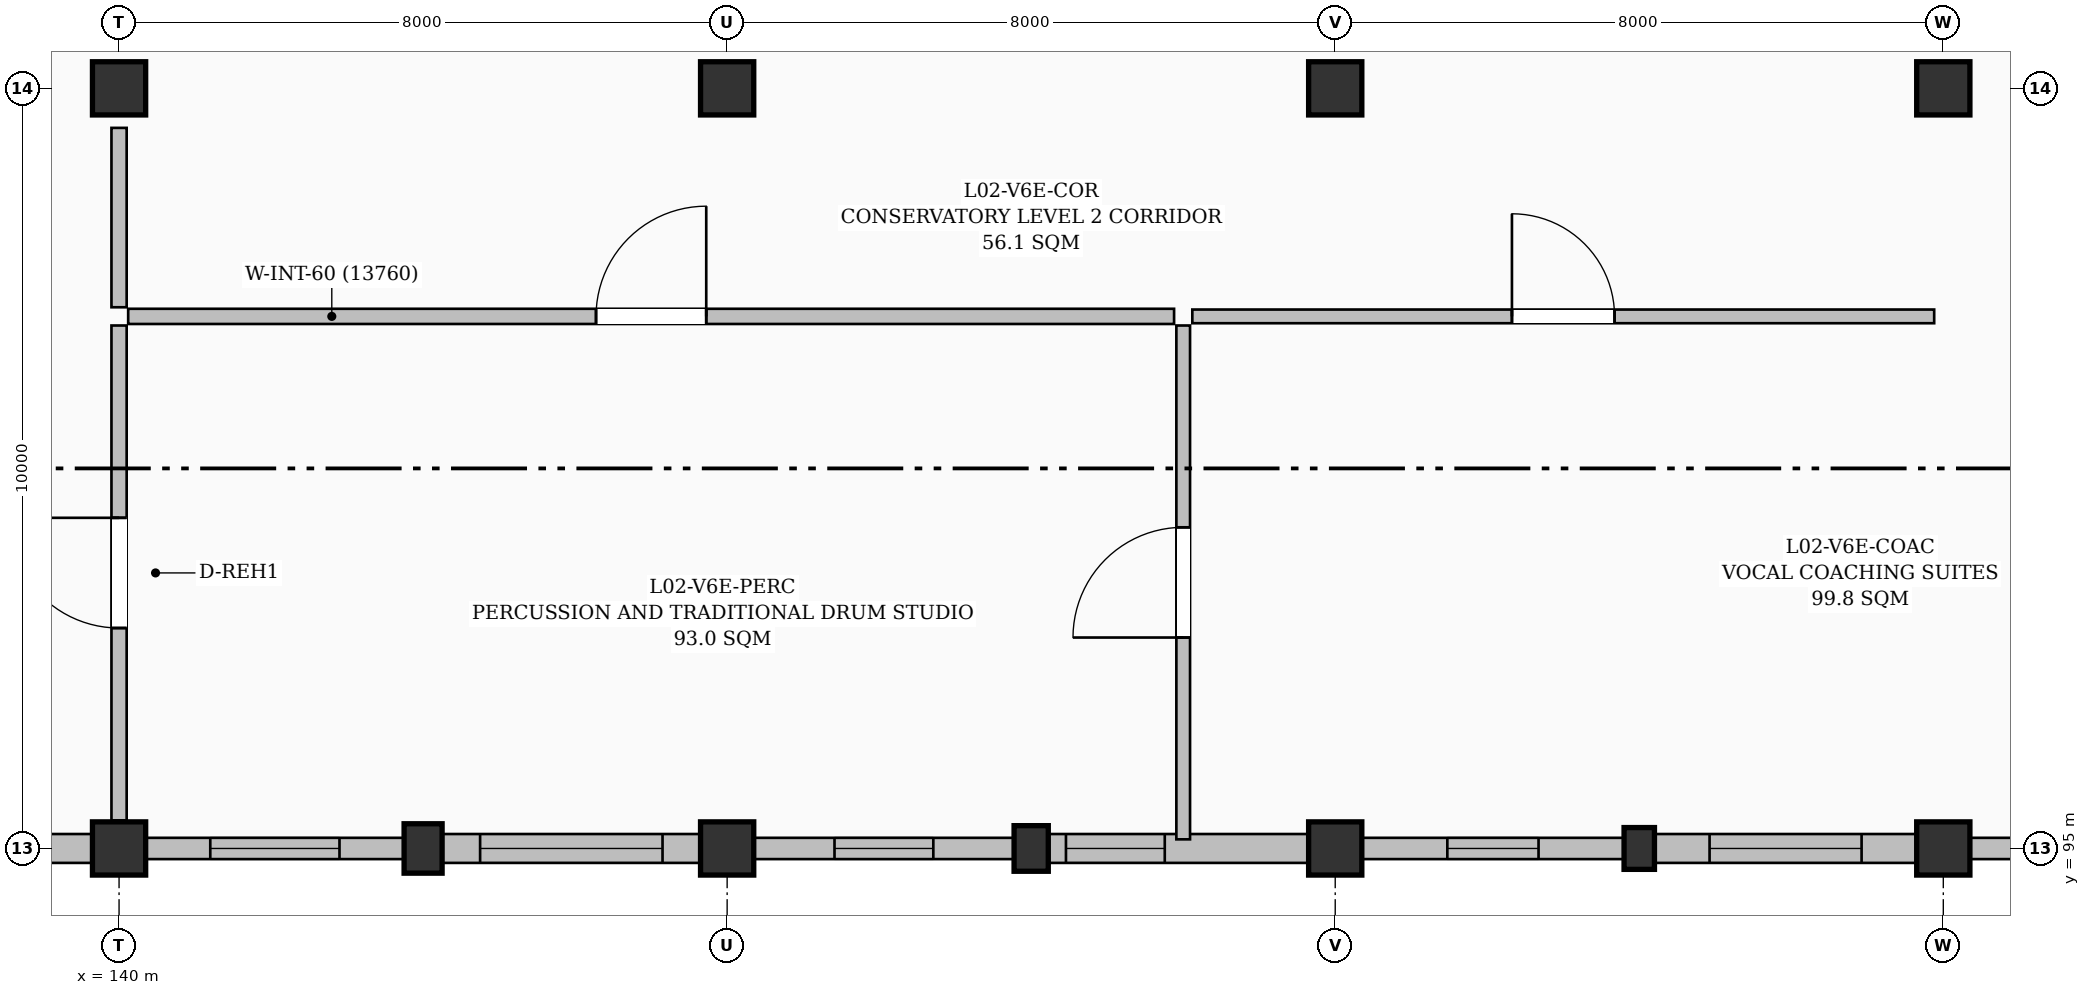
"""IFC4 building model, lengths in metres.
Left out: names, types, materials, properties, quantities, classifications, styles, units other than length and angle.
Written with IfcOpenShell. Run it as: python <this file> out.ifc"""

import sys

from ifc_helpers import new_model, si_unit, direction, frame, frame_2d, origin, origin_2d, place, context, subcontext, project, spatial, rectangle, extrude, element, fill, save


model = new_model("IFC4")
c1 = context("Model", 3, precision=1e-05, world=origin(), true_north=direction((0.0, 1.0)))
c2 = subcontext(c1, "Body", "Model", "MODEL_VIEW")
j1 = project(units=[si_unit("LENGTHUNIT", "METRE"), si_unit("PLANEANGLEUNIT", "RADIAN")], contexts=[c1])
p1 = place(None, origin())
s1 = spatial("IfcSite", under=j1, at=p1, CompositionType="ELEMENT")
p2 = place(p1, origin())
s2 = spatial("IfcBuilding", under=s1, at=p2, CompositionType="ELEMENT")
p3 = place(p2, frame((0.0, 0.0, 9.3)))
s3 = spatial("IfcBuildingStorey", under=s2, at=p3, CompositionType="ELEMENT", Elevation=9.3)
for number, where, z_axis, x_axis in (
    (1, (140.0, 95.0, 0.0), (0.0, 0.0, 1.0), (1.0, 0.0, 0.0)),
    (2, (140.0, 105.0, 0.0), (0.0, 0.0, 1.0), (1.0, 0.0, 0.0)),
):
    element("IfcColumn", number, at=place(p3, frame(where, z_axis=z_axis, x_axis=x_axis)), inside=s3, PredefinedType="COLUMN", context=c2, shape_type="SweptSolid", body=[
        extrude(rectangle(XDim=0.7, YDim=0.7, at=origin_2d()), origin(), (0.0, 0.0, 1.0), 4.5),
    ])
p4 = place(p3, frame((144.0, 95.0, 0.0), z_axis=(0.0, 0.0, 1.0), x_axis=(1.0, 0.0, 0.0)))
e3 = element("IfcColumn", 3, at=p4, inside=s3, PredefinedType="PILASTER", context=c2, shape_type="SweptSolid", body=[
    extrude(rectangle(XDim=0.5, YDim=0.65, at=origin_2d()), origin(), (0.0, 0.0, 1.0), 4.5),
])
for number, where, z_axis, x_axis in (
    (4, (148.0, 95.0, 0.0), (0.0, 0.0, 1.0), (1.0, 0.0, 0.0)),
    (5, (148.0, 105.0, 0.0), (0.0, 0.0, 1.0), (1.0, 0.0, 0.0)),
):
    element("IfcColumn", number, at=place(p3, frame(where, z_axis=z_axis, x_axis=x_axis)), inside=s3, PredefinedType="COLUMN", context=c2, shape_type="SweptSolid", body=[
        extrude(rectangle(XDim=0.7, YDim=0.7, at=origin_2d()), origin(), (0.0, 0.0, 1.0), 4.5),
    ])
p5 = place(p3, frame((152.0, 95.0, 0.0), z_axis=(0.0, 0.0, 1.0), x_axis=(1.0, 0.0, 0.0)))
e6 = element("IfcColumn", 6, at=p5, inside=s3, PredefinedType="PILASTER", context=c2, shape_type="SweptSolid", body=[
    extrude(rectangle(XDim=0.45, YDim=0.6, at=origin_2d()), origin(), (0.0, 0.0, 1.0), 4.5),
])
for number, where, z_axis, x_axis in (
    (7, (156.0, 95.0, 0.0), (0.0, 0.0, 1.0), (1.0, 0.0, 0.0)),
    (8, (156.0, 105.0, 0.0), (0.0, 0.0, 1.0), (1.0, 0.0, 0.0)),
):
    element("IfcColumn", number, at=place(p3, frame(where, z_axis=z_axis, x_axis=x_axis)), inside=s3, PredefinedType="COLUMN", context=c2, shape_type="SweptSolid", body=[
        extrude(rectangle(XDim=0.7, YDim=0.7, at=origin_2d()), origin(), (0.0, 0.0, 1.0), 4.5),
    ])
p6 = place(p3, frame((160.0, 95.0, 0.0), z_axis=(0.0, 0.0, 1.0), x_axis=(1.0, 0.0, 0.0)))
e9 = element("IfcColumn", 9, at=p6, inside=s3, PredefinedType="PILASTER", context=c2, shape_type="SweptSolid", body=[
    extrude(rectangle(XDim=0.4, YDim=0.55, at=origin_2d()), origin(), (0.0, 0.0, 1.0), 4.5),
])
for number, where, z_axis, x_axis in (
    (10, (164.0, 95.0, 0.0), (0.0, 0.0, 1.0), (1.0, 0.0, 0.0)),
    (11, (164.0, 105.0, 0.0), (0.0, 0.0, 1.0), (1.0, 0.0, 0.0)),
):
    element("IfcColumn", number, at=place(p3, frame(where, z_axis=z_axis, x_axis=x_axis)), inside=s3, PredefinedType="COLUMN", context=c2, shape_type="SweptSolid", body=[
        extrude(rectangle(XDim=0.7, YDim=0.7, at=origin_2d()), origin(), (0.0, 0.0, 1.0), 4.5),
    ])
p7 = place(p3, frame((167.75, 95.0, 0.0), z_axis=(0.0, 0.0, 1.0), x_axis=(-1.0, 0.0, 0.0)))
e12 = element("IfcWall", 12, at=p7, inside=s3, PredefinedType="SOLIDWALL", context=c2, shape_type="SweptSolid", body=[
    extrude(rectangle(XDim=3.4, YDim=0.28, at=frame_2d((1.7, 0.0))), origin(), (0.0, 0.0, 1.0), 3.655),
])
p8 = place(p7, frame((1.0, 0.0, 0.95)))
e13 = element("IfcOpeningElement", 13, at=p8, cuts=e12, PredefinedType="OPENING", context=c2, shape_type="SweptSolid", body=[
    extrude(rectangle(XDim=1.4, YDim=1.8, at=frame_2d((0.7, 0.9))), frame((0.0, 0.15, 0.0), z_axis=(0.0, -1.0, 0.0), x_axis=(1.0, 0.0, 0.0)), (0.0, 0.0, 1.0), 0.3),
])
p9 = place(p3, frame((163.65, 95.0, 0.0), z_axis=(0.0, 0.0, 1.0), x_axis=(-1.0, 0.0, 0.0)))
e14 = element("IfcWall", 14, at=p9, inside=s3, PredefinedType="SOLIDWALL", context=c2, shape_type="SweptSolid", body=[
    extrude(rectangle(XDim=3.45, YDim=0.38, at=frame_2d((1.725, 0.0))), origin(), (0.0, 0.0, 1.0), 3.705),
])
p10 = place(p9, frame((0.725, 0.0, 0.95)))
e15 = element("IfcOpeningElement", 15, at=p10, cuts=e14, PredefinedType="OPENING", context=c2, shape_type="SweptSolid", body=[
    extrude(rectangle(XDim=2.0, YDim=1.8, at=frame_2d((1.0, 0.9))), frame((0.0, 0.2, 0.0), z_axis=(0.0, -1.0, 0.0), x_axis=(1.0, 0.0, 0.0)), (0.0, 0.0, 1.0), 0.4),
])
p11 = place(p3, frame((159.8, 95.0, 0.0), z_axis=(0.0, 0.0, 1.0), x_axis=(-1.0, 0.0, 0.0)))
e16 = element("IfcWall", 16, at=p11, inside=s3, PredefinedType="SOLIDWALL", context=c2, shape_type="SweptSolid", body=[
    extrude(rectangle(XDim=3.45, YDim=0.28, at=frame_2d((1.725, 0.0))), origin(), (0.0, 0.0, 1.0), 3.705),
])
p12 = place(p11, frame((1.125, 0.0, 0.95)))
e17 = element("IfcOpeningElement", 17, at=p12, cuts=e16, PredefinedType="OPENING", context=c2, shape_type="SweptSolid", body=[
    extrude(rectangle(XDim=1.2, YDim=1.5, at=frame_2d((0.6, 0.75))), frame((0.0, 0.15, 0.0), z_axis=(0.0, -1.0, 0.0), x_axis=(1.0, 0.0, 0.0)), (0.0, 0.0, 1.0), 0.3),
])
p13 = place(p3, frame((155.65, 95.0, 0.0), z_axis=(0.0, 0.0, 1.0), x_axis=(-1.0, 0.0, 0.0)))
e18 = element("IfcWall", 18, at=p13, inside=s3, PredefinedType="SOLIDWALL", context=c2, shape_type="SweptSolid", body=[
    extrude(rectangle(XDim=3.425, YDim=0.38, at=frame_2d((1.712, 0.0))), origin(), (0.0, 0.0, 1.0), 3.755),
])
p14 = place(p13, frame((1.893, 0.0, 0.95)))
e19 = element("IfcOpeningElement", 19, at=p14, cuts=e18, PredefinedType="OPENING", context=c2, shape_type="SweptSolid", body=[
    extrude(rectangle(XDim=1.3, YDim=1.4, at=frame_2d((0.65, 0.7))), frame((0.0, 0.2, 0.0), z_axis=(0.0, -1.0, 0.0), x_axis=(1.0, 0.0, 0.0)), (0.0, 0.0, 1.0), 0.4),
])
p15 = place(p3, frame((151.775, 95.0, 0.0), z_axis=(0.0, 0.0, 1.0), x_axis=(-1.0, 0.0, 0.0)))
e20 = element("IfcWall", 20, at=p15, inside=s3, PredefinedType="SOLIDWALL", context=c2, shape_type="SweptSolid", body=[
    extrude(rectangle(XDim=3.425, YDim=0.28, at=frame_2d((1.712, 0.0))), origin(), (0.0, 0.0, 1.0), 3.755),
])
p16 = place(p15, frame((1.062, 0.0, 0.95)))
e21 = element("IfcOpeningElement", 21, at=p16, cuts=e20, PredefinedType="OPENING", context=c2, shape_type="SweptSolid", body=[
    extrude(rectangle(XDim=1.3, YDim=1.4, at=frame_2d((0.65, 0.7))), frame((0.0, 0.15, 0.0), z_axis=(0.0, -1.0, 0.0), x_axis=(1.0, 0.0, 0.0)), (0.0, 0.0, 1.0), 0.3),
])
p17 = place(p3, frame((147.65, 95.0, 0.0), z_axis=(0.0, 0.0, 1.0), x_axis=(-1.0, 0.0, 0.0)))
e22 = element("IfcWall", 22, at=p17, inside=s3, PredefinedType="SOLIDWALL", context=c2, shape_type="SweptSolid", body=[
    extrude(rectangle(XDim=3.4, YDim=0.38, at=frame_2d((1.7, 0.0))), origin(), (0.0, 0.0, 1.0), 3.955),
])
p18 = place(p17, frame((0.5, 0.0, 0.95)))
e23 = element("IfcOpeningElement", 23, at=p18, cuts=e22, PredefinedType="OPENING", context=c2, shape_type="SweptSolid", body=[
    extrude(rectangle(XDim=2.4, YDim=1.2, at=frame_2d((1.2, 0.6))), frame((0.0, 0.2, 0.0), z_axis=(0.0, -1.0, 0.0), x_axis=(1.0, 0.0, 0.0)), (0.0, 0.0, 1.0), 0.4),
])
p19 = place(p3, frame((143.75, 95.0, 0.0), z_axis=(0.0, 0.0, 1.0), x_axis=(-1.0, 0.0, 0.0)))
e24 = element("IfcWall", 24, at=p19, inside=s3, PredefinedType="SOLIDWALL", context=c2, shape_type="SweptSolid", body=[
    extrude(rectangle(XDim=3.4, YDim=0.28, at=frame_2d((1.7, 0.0))), origin(), (0.0, 0.0, 1.0), 3.955),
])
p20 = place(p19, frame((0.85, 0.0, 0.95)))
e25 = element("IfcOpeningElement", 25, at=p20, cuts=e24, PredefinedType="OPENING", context=c2, shape_type="SweptSolid", body=[
    extrude(rectangle(XDim=1.7, YDim=2.0, at=frame_2d((0.85, 1.0))), frame((0.0, 0.15, 0.0), z_axis=(0.0, -1.0, 0.0), x_axis=(1.0, 0.0, 0.0)), (0.0, 0.0, 1.0), 0.3),
])
p21 = place(p3, frame((139.65, 95.0, 0.0), z_axis=(0.0, 0.0, 1.0), x_axis=(-1.0, 0.0, 0.0)))
e26 = element("IfcWall", 26, at=p21, inside=s3, PredefinedType="SOLIDWALL", context=c2, shape_type="SweptSolid", body=[
    extrude(rectangle(XDim=3.45, YDim=0.38, at=frame_2d((1.725, 0.0))), origin(), (0.0, 0.0, 1.0), 3.655),
])
p22 = place(p21, frame((0.925, 0.0, 0.95)))
e27 = element("IfcOpeningElement", 27, at=p22, cuts=e26, PredefinedType="OPENING", context=c2, shape_type="SweptSolid", body=[
    extrude(rectangle(XDim=1.6, YDim=1.8, at=frame_2d((0.8, 0.9))), frame((0.0, 0.2, 0.0), z_axis=(0.0, -1.0, 0.0), x_axis=(1.0, 0.0, 0.0)), (0.0, 0.0, 1.0), 0.4),
])
p23 = place(p3, frame((140.0, 95.37, 0.0), z_axis=(0.0, 0.0, 1.0), x_axis=(0.0, 1.0, 0.0)))
e28 = element("IfcWall", 28, at=p23, inside=s3, PredefinedType="PARTITIONING", context=c2, shape_type="SweptSolid", body=[
    extrude(rectangle(XDim=6.51, YDim=0.2, at=frame_2d((3.255, 0.0))), origin(), (0.0, 0.0, 1.0), 3.985),
])
p24 = place(p23, frame((2.53, 0.0, 0.0)))
e29 = element("IfcOpeningElement", 29, at=p24, cuts=e28, PredefinedType="OPENING", context=c2, shape_type="SweptSolid", body=[
    extrude(rectangle(XDim=1.45, YDim=2.25, at=frame_2d((0.725, 1.125))), frame((0.0, 0.11, 0.0), z_axis=(0.0, -1.0, 0.0), x_axis=(1.0, 0.0, 0.0)), (0.0, 0.0, 1.0), 0.22),
])
p25 = place(p3, frame((140.0, 102.12, 0.0), z_axis=(0.0, 0.0, 1.0), x_axis=(0.0, 1.0, 0.0)))
e30 = element("IfcWall", 30, at=p25, inside=s3, PredefinedType="PARTITIONING", context=c2, shape_type="SweptSolid", body=[
    extrude(rectangle(XDim=2.36, YDim=0.2, at=frame_2d((1.18, 0.0))), origin(), (0.0, 0.0, 1.0), 3.985),
])
p26 = place(p3, frame((154.0, 95.12, 0.0), z_axis=(0.0, 0.0, 1.0), x_axis=(0.0, 1.0, 0.0)))
e31 = element("IfcWall", 31, at=p26, inside=s3, PredefinedType="PARTITIONING", context=c2, shape_type="SweptSolid", body=[
    extrude(rectangle(XDim=6.76, YDim=0.18, at=frame_2d((3.38, 0.0))), origin(), (0.0, 0.0, 1.0), 4.27),
])
p27 = place(p26, frame((2.655, 0.0, 0.0)))
e32 = element("IfcOpeningElement", 32, at=p27, cuts=e31, PredefinedType="OPENING", context=c2, shape_type="SweptSolid", body=[
    extrude(rectangle(XDim=1.45, YDim=2.25, at=frame_2d((0.725, 1.125))), frame((0.0, 0.1, 0.0), z_axis=(0.0, -1.0, 0.0), x_axis=(1.0, 0.0, 0.0)), (0.0, 0.0, 1.0), 0.2),
])
p28 = place(p3, frame((140.12, 102.0, 0.0), z_axis=(0.0, 0.0, 1.0), x_axis=(1.0, 0.0, 0.0)))
e33 = element("IfcWall", 33, at=p28, inside=s3, PredefinedType="PARTITIONING", context=c2, shape_type="SweptSolid", body=[
    extrude(rectangle(XDim=13.76, YDim=0.2, at=frame_2d((6.88, 0.0))), origin(), (0.0, 0.0, 1.0), 3.925),
])
p29 = place(p28, frame((6.155, 0.0, 0.0)))
e34 = element("IfcOpeningElement", 34, at=p29, cuts=e33, PredefinedType="OPENING", context=c2, shape_type="SweptSolid", body=[
    extrude(rectangle(XDim=1.45, YDim=2.25, at=frame_2d((0.725, 1.125))), frame((0.0, 0.11, 0.0), z_axis=(0.0, -1.0, 0.0), x_axis=(1.0, 0.0, 0.0)), (0.0, 0.0, 1.0), 0.22),
])
p30 = place(p3, frame((154.12, 102.0, 0.0), z_axis=(0.0, 0.0, 1.0), x_axis=(1.0, 0.0, 0.0)))
e35 = element("IfcWall", 35, at=p30, inside=s3, PredefinedType="PARTITIONING", context=c2, shape_type="SweptSolid", body=[
    extrude(rectangle(XDim=9.76, YDim=0.18, at=frame_2d((4.88, 0.0))), origin(), (0.0, 0.0, 1.0), 3.925),
])
p31 = place(p30, frame((4.205, 0.0, 0.0)))
e36 = element("IfcOpeningElement", 36, at=p31, cuts=e35, PredefinedType="OPENING", context=c2, shape_type="SweptSolid", body=[
    extrude(rectangle(XDim=1.35, YDim=2.2, at=frame_2d((0.675, 1.1))), frame((0.0, 0.1, 0.0), z_axis=(0.0, -1.0, 0.0), x_axis=(1.0, 0.0, 0.0)), (0.0, 0.0, 1.0), 0.2),
])
p32 = place(p10, origin())
e37 = element("IfcWindow", 37, at=p32, inside=s3, PartitioningType="TRIPLE_PANEL_VERTICAL", PredefinedType="WINDOW", context=c2, shape_type="SweptSolid", body=[
    extrude(rectangle(XDim=2.0, YDim=1.8, at=frame_2d((1.0, 0.9))), frame((0.0, 0.03, 0.0), z_axis=(0.0, -1.0, 0.0), x_axis=(1.0, 0.0, 0.0)), (0.0, 0.0, 1.0), 0.06),
])
fill(e15, e37)
p33 = place(p12, origin())
e38 = element("IfcWindow", 38, at=p33, inside=s3, PartitioningType="SINGLE_PANEL", PredefinedType="WINDOW", context=c2, shape_type="SweptSolid", body=[
    extrude(rectangle(XDim=1.2, YDim=1.5, at=frame_2d((0.6, 0.75))), frame((0.0, 0.03, 0.0), z_axis=(0.0, -1.0, 0.0), x_axis=(1.0, 0.0, 0.0)), (0.0, 0.0, 1.0), 0.06),
])
fill(e17, e38)
p34 = place(p14, origin())
e39 = element("IfcWindow", 39, at=p34, inside=s3, PartitioningType="TRIPLE_PANEL_VERTICAL", PredefinedType="WINDOW", context=c2, shape_type="SweptSolid", body=[
    extrude(rectangle(XDim=1.3, YDim=1.4, at=frame_2d((0.65, 0.7))), frame((0.0, 0.03, 0.0), z_axis=(0.0, -1.0, 0.0), x_axis=(1.0, 0.0, 0.0)), (0.0, 0.0, 1.0), 0.06),
])
fill(e19, e39)
p35 = place(p16, origin())
e40 = element("IfcWindow", 40, at=p35, inside=s3, PartitioningType="SINGLE_PANEL", PredefinedType="WINDOW", context=c2, shape_type="SweptSolid", body=[
    extrude(rectangle(XDim=1.3, YDim=1.4, at=frame_2d((0.65, 0.7))), frame((0.0, 0.03, 0.0), z_axis=(0.0, -1.0, 0.0), x_axis=(1.0, 0.0, 0.0)), (0.0, 0.0, 1.0), 0.06),
])
fill(e21, e40)
p36 = place(p18, origin())
e41 = element("IfcWindow", 41, at=p36, inside=s3, PartitioningType="TRIPLE_PANEL_HORIZONTAL", PredefinedType="WINDOW", context=c2, shape_type="SweptSolid", body=[
    extrude(rectangle(XDim=2.4, YDim=1.2, at=frame_2d((1.2, 0.6))), frame((0.0, 0.03, 0.0), z_axis=(0.0, -1.0, 0.0), x_axis=(1.0, 0.0, 0.0)), (0.0, 0.0, 1.0), 0.06),
])
fill(e23, e41)
p37 = place(p20, origin())
e42 = element("IfcWindow", 42, at=p37, inside=s3, PartitioningType="DOUBLE_PANEL_VERTICAL", PredefinedType="WINDOW", context=c2, shape_type="SweptSolid", body=[
    extrude(rectangle(XDim=1.7, YDim=2.0, at=frame_2d((0.85, 1.0))), frame((0.0, 0.03, 0.0), z_axis=(0.0, -1.0, 0.0), x_axis=(1.0, 0.0, 0.0)), (0.0, 0.0, 1.0), 0.06),
])
fill(e25, e42)
p38 = place(p24, origin())
e43 = element("IfcDoor", 43, at=p38, inside=s3, OperationType="SINGLE_SWING_RIGHT", PredefinedType="DOOR", context=c2, shape_type="SweptSolid", body=[
    extrude(rectangle(XDim=1.45, YDim=2.25, at=frame_2d((0.725, 1.125))), frame((0.0, 0.025, 0.0), z_axis=(0.0, -1.0, 0.0), x_axis=(1.0, 0.0, 0.0)), (0.0, 0.0, 1.0), 0.05),
])
fill(e29, e43)
p39 = place(p27, origin())
e44 = element("IfcDoor", 44, at=p39, inside=s3, OperationType="SINGLE_SWING_LEFT", PredefinedType="DOOR", context=c2, shape_type="SweptSolid", body=[
    extrude(rectangle(XDim=1.45, YDim=2.25, at=frame_2d((0.725, 1.125))), frame((0.0, 0.025, 0.0), z_axis=(0.0, -1.0, 0.0), x_axis=(1.0, 0.0, 0.0)), (0.0, 0.0, 1.0), 0.05),
])
fill(e32, e44)
p40 = place(p29, origin())
e45 = element("IfcDoor", 45, at=p40, inside=s3, OperationType="SINGLE_SWING_RIGHT", PredefinedType="DOOR", context=c2, shape_type="SweptSolid", body=[
    extrude(rectangle(XDim=1.45, YDim=2.25, at=frame_2d((0.725, 1.125))), frame((0.0, 0.025, 0.0), z_axis=(0.0, -1.0, 0.0), x_axis=(1.0, 0.0, 0.0)), (0.0, 0.0, 1.0), 0.05),
])
fill(e34, e45)
p41 = place(p31, origin())
e46 = element("IfcDoor", 46, at=p41, inside=s3, OperationType="SINGLE_SWING_LEFT", PredefinedType="DOOR", context=c2, shape_type="SweptSolid", body=[
    extrude(rectangle(XDim=1.35, YDim=2.2, at=frame_2d((0.675, 1.1))), frame((0.0, 0.025, 0.0), z_axis=(0.0, -1.0, 0.0), x_axis=(1.0, 0.0, 0.0)), (0.0, 0.0, 1.0), 0.05),
])
fill(e36, e46)
save(model, sys.argv[1])
